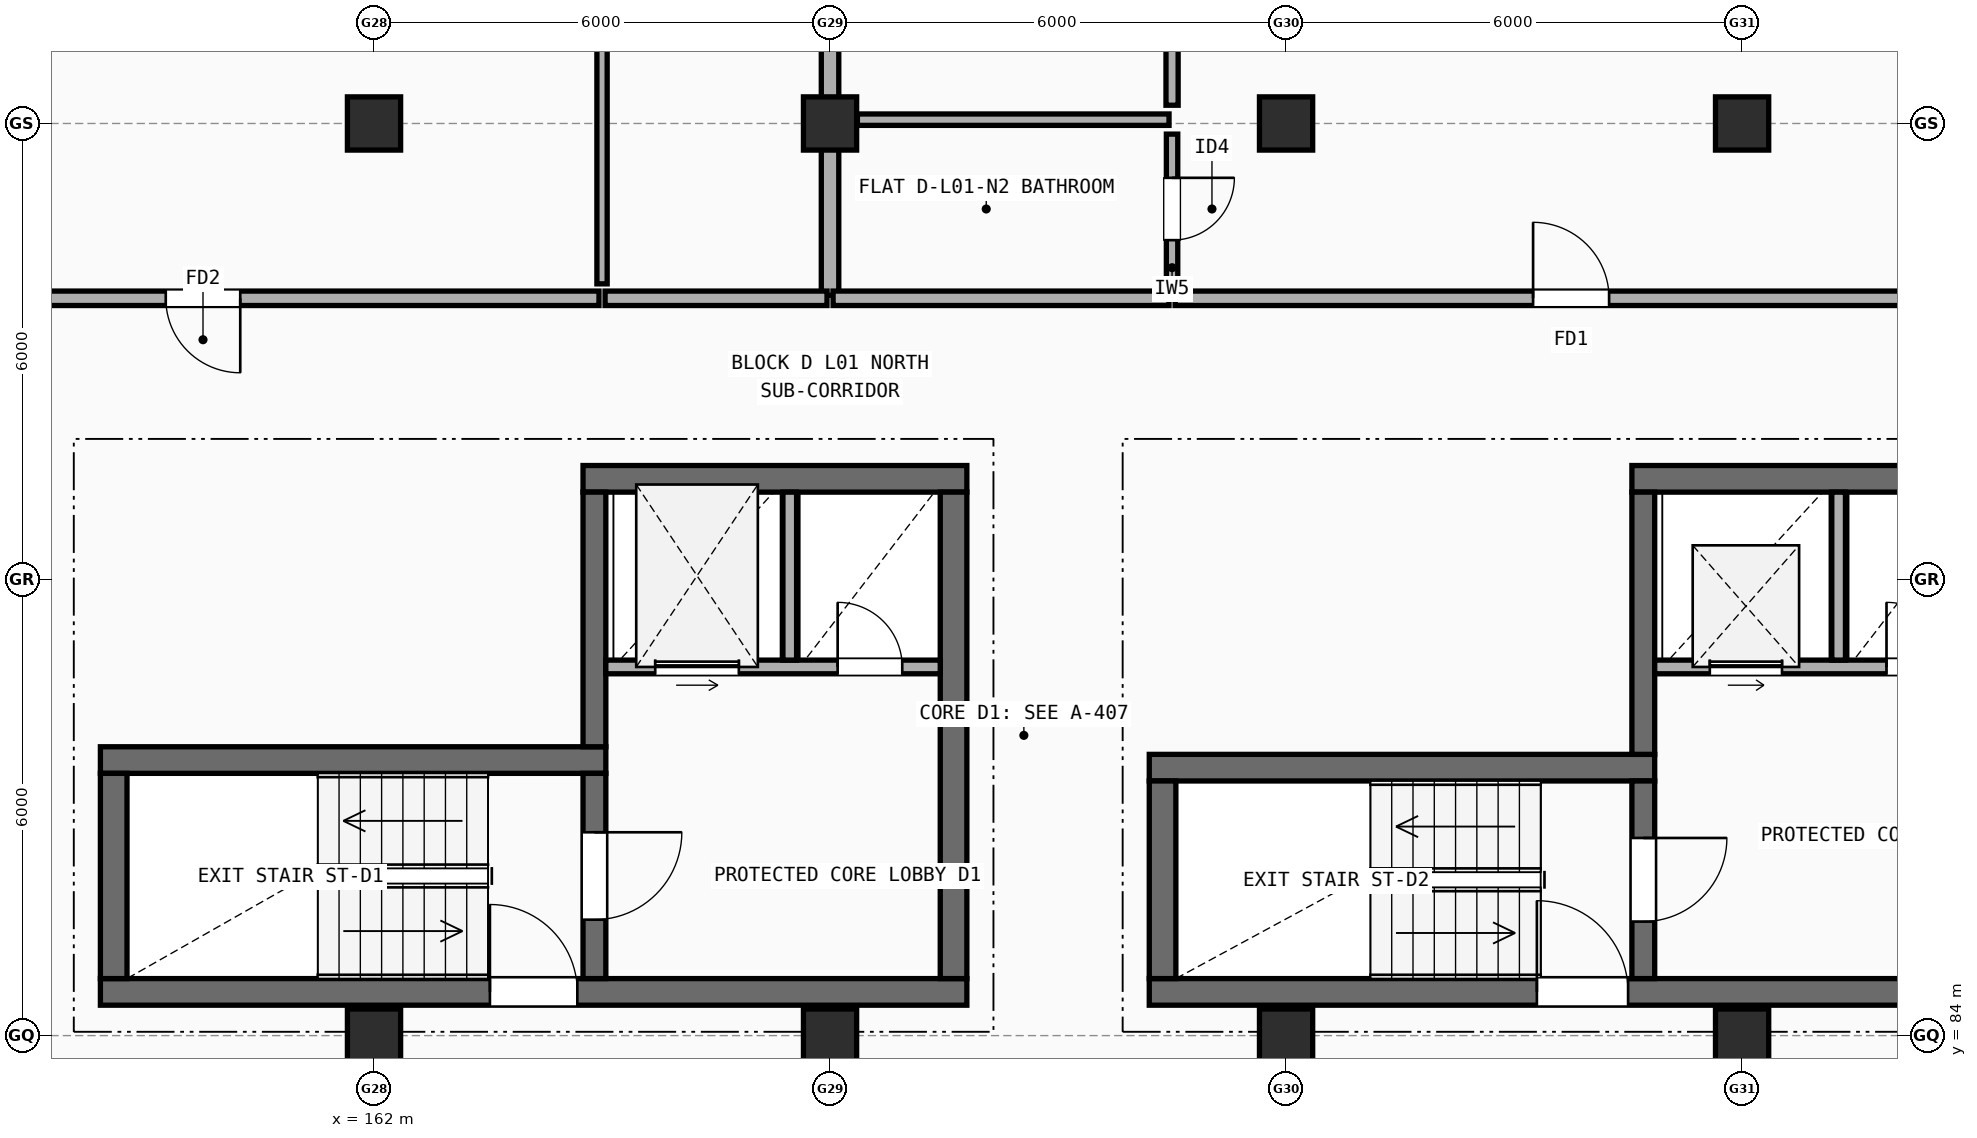
"""IFC4 building model, lengths in metres.
Left out: names, types, materials, properties, quantities, classifications, styles, units other than length and angle.
Written with IfcOpenShell. Run it as: python <this file> out.ifc"""

import sys

from ifc_helpers import new_model, si_unit, direction, frame, frame_2d, origin, origin_2d, place, context, subcontext, project, spatial, rectangle, extrude, element, fill, save


model = new_model("IFC4")
c1 = context("Model", 3, precision=1e-05, world=origin(), true_north=direction((0.0, 1.0)))
c2 = subcontext(c1, "Body", "Model", "MODEL_VIEW")
j1 = project(units=[si_unit("LENGTHUNIT", "METRE"), si_unit("PLANEANGLEUNIT", "RADIAN")], contexts=[c1])
p1 = place(None, origin())
s1 = spatial("IfcSite", under=j1, at=p1, CompositionType="ELEMENT")
p2 = place(p1, origin())
s2 = spatial("IfcBuilding", under=s1, at=p2, CompositionType="ELEMENT")
p3 = place(p2, frame((0.0, 0.0, 4.5)))
s3 = spatial("IfcBuildingStorey", under=s2, at=p3, CompositionType="ELEMENT", Elevation=4.5)
for number, where, z_axis, x_axis in (
    (1, (162.0, 84.0, 0.0), (0.0, 0.0, 1.0), (1.0, 0.0, 0.0)),
    (2, (162.0, 96.0, 0.0), (0.0, 0.0, 1.0), (1.0, 0.0, 0.0)),
    (3, (168.0, 84.0, 0.0), (0.0, 0.0, 1.0), (1.0, 0.0, 0.0)),
    (4, (168.0, 96.0, 0.0), (0.0, 0.0, 1.0), (1.0, 0.0, 0.0)),
    (5, (174.0, 84.0, 0.0), (0.0, 0.0, 1.0), (1.0, 0.0, 0.0)),
    (6, (174.0, 96.0, 0.0), (0.0, 0.0, 1.0), (1.0, 0.0, 0.0)),
    (7, (180.0, 84.0, 0.0), (0.0, 0.0, 1.0), (1.0, 0.0, 0.0)),
    (8, (180.0, 96.0, 0.0), (0.0, 0.0, 1.0), (1.0, 0.0, 0.0)),
):
    element("IfcColumn", number, at=place(p3, frame(where, z_axis=z_axis, x_axis=x_axis)), inside=s3, PredefinedType="COLUMN", context=c2, shape_type="SweptSolid", body=[
        extrude(rectangle(XDim=0.7, YDim=0.7, at=origin_2d()), origin(), (0.0, 0.0, 1.0), 2.945),
    ])
p4 = place(p3, frame((158.4, 84.575, 0.0), z_axis=(0.0, 0.0, 1.0), x_axis=(1.0, 0.0, 0.0)))
e9 = element("IfcWall", 9, at=p4, inside=s3, PredefinedType="SHEAR", context=c2, shape_type="SweptSolid", body=[
    extrude(rectangle(XDim=11.4, YDim=0.35, at=frame_2d((5.7, 0.0))), origin(), (0.0, 0.0, 1.0), 2.945),
])
p5 = place(p4, frame((5.125, 0.0, 0.0)))
e10 = element("IfcOpeningElement", 10, at=p5, cuts=e9, PredefinedType="OPENING", context=c2, shape_type="SweptSolid", body=[
    extrude(rectangle(XDim=1.15, YDim=2.15, at=frame_2d((0.575, 1.075))), frame((0.0, 0.185, 0.0), z_axis=(0.0, -1.0, 0.0), x_axis=(1.0, 0.0, 0.0)), (0.0, 0.0, 1.0), 0.37),
])
p6 = place(p3, frame((165.05, 87.625, 0.0), z_axis=(0.0, 0.0, 1.0), x_axis=(-1.0, 0.0, 0.0)))
e11 = element("IfcWall", 11, at=p6, inside=s3, PredefinedType="SHEAR", context=c2, shape_type="SweptSolid", body=[
    extrude(rectangle(XDim=6.65, YDim=0.35, at=frame_2d((3.325, 0.0))), origin(), (0.0, 0.0, 1.0), 2.945),
])
p7 = place(p3, frame((158.575, 87.45, 0.0), z_axis=(0.0, 0.0, 1.0), x_axis=(0.0, -1.0, 0.0)))
e12 = element("IfcWall", 12, at=p7, inside=s3, PredefinedType="SHEAR", context=c2, shape_type="SweptSolid", body=[
    extrude(rectangle(XDim=2.7, YDim=0.35, at=frame_2d((1.35, 0.0))), origin(), (0.0, 0.0, 1.0), 2.945),
])
p8 = place(p3, frame((164.9, 84.75, 0.0), z_axis=(0.0, 0.0, 1.0), x_axis=(0.0, 1.0, 0.0)))
e13 = element("IfcWall", 13, at=p8, inside=s3, PredefinedType="SHEAR", context=c2, shape_type="SweptSolid", body=[
    extrude(rectangle(XDim=2.7, YDim=0.3, at=frame_2d((1.35, 0.0))), origin(), (0.0, 0.0, 1.0), 2.945),
])
p9 = place(p8, frame((0.775, 0.0, 0.0)))
e14 = element("IfcOpeningElement", 14, at=p9, cuts=e13, PredefinedType="OPENING", context=c2, shape_type="SweptSolid", body=[
    extrude(rectangle(XDim=1.15, YDim=2.15, at=frame_2d((0.575, 1.075))), frame((0.0, 0.16, 0.0), z_axis=(0.0, -1.0, 0.0), x_axis=(1.0, 0.0, 0.0)), (0.0, 0.0, 1.0), 0.32),
])
p10 = place(p3, frame((169.8, 91.325, 0.0), z_axis=(0.0, 0.0, 1.0), x_axis=(-1.0, 0.0, 0.0)))
e15 = element("IfcWall", 15, at=p10, inside=s3, PredefinedType="SHEAR", context=c2, shape_type="SweptSolid", body=[
    extrude(rectangle(XDim=5.05, YDim=0.35, at=frame_2d((2.525, 0.0))), origin(), (0.0, 0.0, 1.0), 2.945),
])
p11 = place(p3, frame((169.625, 84.75, 0.0), z_axis=(0.0, 0.0, 1.0), x_axis=(0.0, 1.0, 0.0)))
e16 = element("IfcWall", 16, at=p11, inside=s3, PredefinedType="SHEAR", context=c2, shape_type="SweptSolid", body=[
    extrude(rectangle(XDim=6.4, YDim=0.35, at=frame_2d((3.2, 0.0))), origin(), (0.0, 0.0, 1.0), 2.945),
])
p12 = place(p3, frame((164.9, 87.8, 0.0), z_axis=(0.0, 0.0, 1.0), x_axis=(0.0, 1.0, 0.0)))
e17 = element("IfcWall", 17, at=p12, inside=s3, PredefinedType="SHEAR", context=c2, shape_type="SweptSolid", body=[
    extrude(rectangle(XDim=3.35, YDim=0.3, at=frame_2d((1.675, 0.0))), origin(), (0.0, 0.0, 1.0), 2.945),
])
p13 = place(p3, frame((165.05, 88.85, 0.0), z_axis=(0.0, 0.0, 1.0), x_axis=(1.0, 0.0, 0.0)))
e18 = element("IfcWall", 18, at=p13, inside=s3, PredefinedType="SOLIDWALL", context=c2, shape_type="SweptSolid", body=[
    extrude(rectangle(XDim=4.4, YDim=0.18, at=frame_2d((2.2, 0.0))), origin(), (0.0, 0.0, 1.0), 2.945),
])
p14 = place(p13, frame((0.65, 0.0, 0.0)))
e19 = element("IfcOpeningElement", 19, at=p14, cuts=e18, PredefinedType="OPENING", context=c2, shape_type="SweptSolid", body=[
    extrude(rectangle(XDim=1.1, YDim=2.15, at=frame_2d((0.55, 1.075))), frame((0.0, 0.1, 0.0), z_axis=(0.0, -1.0, 0.0), x_axis=(1.0, 0.0, 0.0)), (0.0, 0.0, 1.0), 0.2),
])
p15 = place(p13, frame((3.05, 0.0, 0.0)))
e20 = element("IfcOpeningElement", 20, at=p15, cuts=e18, PredefinedType="OPENING", context=c2, shape_type="SweptSolid", body=[
    extrude(rectangle(XDim=0.85, YDim=2.1, at=frame_2d((0.425, 1.05))), frame((0.0, 0.1, 0.0), z_axis=(0.0, -1.0, 0.0), x_axis=(1.0, 0.0, 0.0)), (0.0, 0.0, 1.0), 0.2),
])
p16 = place(p3, frame((167.47, 88.94, 0.0), z_axis=(0.0, 0.0, 1.0), x_axis=(0.0, 1.0, 0.0)))
e21 = element("IfcWall", 21, at=p16, inside=s3, PredefinedType="SOLIDWALL", context=c2, shape_type="SweptSolid", body=[
    extrude(rectangle(XDim=2.21, YDim=0.18, at=frame_2d((1.105, 0.0))), origin(), (0.0, 0.0, 1.0), 2.945),
])
p17 = place(p3, frame((172.2, 84.575, 0.0), z_axis=(0.0, 0.0, 1.0), x_axis=(1.0, 0.0, 0.0)))
e22 = element("IfcWall", 22, at=p17, inside=s3, PredefinedType="SHEAR", context=c2, shape_type="SweptSolid", body=[
    extrude(rectangle(XDim=11.4, YDim=0.35, at=frame_2d((5.7, 0.0))), origin(), (0.0, 0.0, 1.0), 2.945),
])
p18 = place(p17, frame((5.1, 0.0, 0.0)))
e23 = element("IfcOpeningElement", 23, at=p18, cuts=e22, PredefinedType="OPENING", context=c2, shape_type="SweptSolid", body=[
    extrude(rectangle(XDim=1.2, YDim=2.15, at=frame_2d((0.6, 1.075))), frame((0.0, 0.185, 0.0), z_axis=(0.0, -1.0, 0.0), x_axis=(1.0, 0.0, 0.0)), (0.0, 0.0, 1.0), 0.37),
])
p19 = place(p3, frame((178.85, 87.525, 0.0), z_axis=(0.0, 0.0, 1.0), x_axis=(-1.0, 0.0, 0.0)))
e24 = element("IfcWall", 24, at=p19, inside=s3, PredefinedType="SHEAR", context=c2, shape_type="SweptSolid", body=[
    extrude(rectangle(XDim=6.65, YDim=0.35, at=frame_2d((3.325, 0.0))), origin(), (0.0, 0.0, 1.0), 2.945),
])
p20 = place(p3, frame((172.375, 87.35, 0.0), z_axis=(0.0, 0.0, 1.0), x_axis=(0.0, -1.0, 0.0)))
e25 = element("IfcWall", 25, at=p20, inside=s3, PredefinedType="SHEAR", context=c2, shape_type="SweptSolid", body=[
    extrude(rectangle(XDim=2.6, YDim=0.35, at=frame_2d((1.3, 0.0))), origin(), (0.0, 0.0, 1.0), 2.945),
])
p21 = place(p3, frame((178.7, 84.75, 0.0), z_axis=(0.0, 0.0, 1.0), x_axis=(0.0, 1.0, 0.0)))
e26 = element("IfcWall", 26, at=p21, inside=s3, PredefinedType="SHEAR", context=c2, shape_type="SweptSolid", body=[
    extrude(rectangle(XDim=2.6, YDim=0.3, at=frame_2d((1.3, 0.0))), origin(), (0.0, 0.0, 1.0), 2.945),
])
p22 = place(p21, frame((0.75, 0.0, 0.0)))
e27 = element("IfcOpeningElement", 27, at=p22, cuts=e26, PredefinedType="OPENING", context=c2, shape_type="SweptSolid", body=[
    extrude(rectangle(XDim=1.1, YDim=2.15, at=frame_2d((0.55, 1.075))), frame((0.0, 0.16, 0.0), z_axis=(0.0, -1.0, 0.0), x_axis=(1.0, 0.0, 0.0)), (0.0, 0.0, 1.0), 0.32),
])
p23 = place(p3, frame((183.6, 91.325, 0.0), z_axis=(0.0, 0.0, 1.0), x_axis=(-1.0, 0.0, 0.0)))
e28 = element("IfcWall", 28, at=p23, inside=s3, PredefinedType="SHEAR", context=c2, shape_type="SweptSolid", body=[
    extrude(rectangle(XDim=5.05, YDim=0.35, at=frame_2d((2.525, 0.0))), origin(), (0.0, 0.0, 1.0), 2.945),
])
p24 = place(p3, frame((178.7, 87.7, 0.0), z_axis=(0.0, 0.0, 1.0), x_axis=(0.0, 1.0, 0.0)))
e29 = element("IfcWall", 29, at=p24, inside=s3, PredefinedType="SHEAR", context=c2, shape_type="SweptSolid", body=[
    extrude(rectangle(XDim=3.45, YDim=0.3, at=frame_2d((1.725, 0.0))), origin(), (0.0, 0.0, 1.0), 2.945),
])
p25 = place(p3, frame((178.85, 88.85, 0.0), z_axis=(0.0, 0.0, 1.0), x_axis=(1.0, 0.0, 0.0)))
e30 = element("IfcWall", 30, at=p25, inside=s3, PredefinedType="SOLIDWALL", context=c2, shape_type="SweptSolid", body=[
    extrude(rectangle(XDim=4.4, YDim=0.18, at=frame_2d((2.2, 0.0))), origin(), (0.0, 0.0, 1.0), 2.945),
])
p26 = place(p25, frame((0.725, 0.0, 0.0)))
e31 = element("IfcOpeningElement", 31, at=p26, cuts=e30, PredefinedType="OPENING", context=c2, shape_type="SweptSolid", body=[
    extrude(rectangle(XDim=0.95, YDim=2.15, at=frame_2d((0.475, 1.075))), frame((0.0, 0.1, 0.0), z_axis=(0.0, -1.0, 0.0), x_axis=(1.0, 0.0, 0.0)), (0.0, 0.0, 1.0), 0.2),
])
p27 = place(p25, frame((3.05, 0.0, 0.0)))
e32 = element("IfcOpeningElement", 32, at=p27, cuts=e30, PredefinedType="OPENING", context=c2, shape_type="SweptSolid", body=[
    extrude(rectangle(XDim=0.85, YDim=2.1, at=frame_2d((0.425, 1.05))), frame((0.0, 0.1, 0.0), z_axis=(0.0, -1.0, 0.0), x_axis=(1.0, 0.0, 0.0)), (0.0, 0.0, 1.0), 0.2),
])
p28 = place(p3, frame((181.27, 88.94, 0.0), z_axis=(0.0, 0.0, 1.0), x_axis=(0.0, 1.0, 0.0)))
e33 = element("IfcWall", 33, at=p28, inside=s3, PredefinedType="SOLIDWALL", context=c2, shape_type="SweptSolid", body=[
    extrude(rectangle(XDim=2.21, YDim=0.18, at=frame_2d((1.105, 0.0))), origin(), (0.0, 0.0, 1.0), 2.945),
])
p29 = place(p3, frame((168.0, 93.74, 0.0), z_axis=(0.0, 0.0, 1.0), x_axis=(0.0, 1.0, 0.0)))
e34 = element("IfcWall", 34, at=p29, inside=s3, PredefinedType="SOLIDWALL", context=c2, shape_type="SweptSolid", body=[
    extrude(rectangle(XDim=13.87, YDim=0.23, at=frame_2d((6.935, 0.0))), origin(), (0.0, 0.0, 1.0), 2.945),
])
p30 = place(p3, frame((154.54, 93.7, 0.0), z_axis=(0.0, 0.0, 1.0), x_axis=(1.0, 0.0, 0.0)))
e35 = element("IfcWall", 35, at=p30, inside=s3, PredefinedType="SOLIDWALL", context=c2, shape_type="SweptSolid", body=[
    extrude(rectangle(XDim=10.42, YDim=0.19, at=frame_2d((5.21, 0.0))), origin(), (0.0, 0.0, 1.0), 2.945),
])
p31 = place(p30, frame((4.72, 0.0, 0.0)))
e36 = element("IfcOpeningElement", 36, at=p31, cuts=e35, PredefinedType="OPENING", context=c2, shape_type="SweptSolid", body=[
    extrude(rectangle(XDim=0.98, YDim=2.15, at=frame_2d((0.49, 1.075))), frame((0.0, 0.105, 0.0), z_axis=(0.0, -1.0, 0.0), x_axis=(1.0, 0.0, 0.0)), (0.0, 0.0, 1.0), 0.21),
])
p32 = place(p3, frame((165.04, 93.7, 0.0), z_axis=(0.0, 0.0, 1.0), x_axis=(1.0, 0.0, 0.0)))
e37 = element("IfcWall", 37, at=p32, inside=s3, PredefinedType="SOLIDWALL", context=c2, shape_type="SweptSolid", body=[
    extrude(rectangle(XDim=2.92, YDim=0.19, at=frame_2d((1.46, 0.0))), origin(), (0.0, 0.0, 1.0), 2.945),
])
p33 = place(p3, frame((165.0, 93.89, 0.0), z_axis=(0.0, 0.0, 1.0), x_axis=(0.0, 1.0, 0.0)))
e38 = element("IfcWall", 38, at=p33, inside=s3, PredefinedType="PARTITIONING", context=c2, shape_type="SweptSolid", body=[
    extrude(rectangle(XDim=13.92, YDim=0.135, at=frame_2d((6.96, 0.0))), origin(), (0.0, 0.0, 1.0), 2.458),
])
p34 = place(p33, frame((6.65, 0.0, 0.0)))
e39 = element("IfcOpeningElement", 39, at=p34, cuts=e38, PredefinedType="OPENING", context=c2, shape_type="SweptSolid", body=[
    extrude(rectangle(XDim=0.9, YDim=2.1, at=frame_2d((0.45, 1.05))), frame((0.0, 0.077, 0.0), z_axis=(0.0, -1.0, 0.0), x_axis=(1.0, 0.0, 0.0)), (0.0, 0.0, 1.0), 0.155),
])
p35 = place(p3, frame((168.04, 93.7, 0.0), z_axis=(0.0, 0.0, 1.0), x_axis=(1.0, 0.0, 0.0)))
e40 = element("IfcWall", 40, at=p35, inside=s3, PredefinedType="SOLIDWALL", context=c2, shape_type="SweptSolid", body=[
    extrude(rectangle(XDim=4.42, YDim=0.19, at=frame_2d((2.21, 0.0))), origin(), (0.0, 0.0, 1.0), 2.945),
])
p36 = place(p3, frame((172.54, 93.7, 0.0), z_axis=(0.0, 0.0, 1.0), x_axis=(1.0, 0.0, 0.0)))
e41 = element("IfcWall", 41, at=p36, inside=s3, PredefinedType="SOLIDWALL", context=c2, shape_type="SweptSolid", body=[
    extrude(rectangle(XDim=10.42, YDim=0.19, at=frame_2d((5.21, 0.0))), origin(), (0.0, 0.0, 1.0), 2.945),
])
p37 = place(p36, frame((4.71, 0.0, 0.0)))
e42 = element("IfcOpeningElement", 42, at=p37, cuts=e41, PredefinedType="OPENING", context=c2, shape_type="SweptSolid", body=[
    extrude(rectangle(XDim=1.0, YDim=2.15, at=frame_2d((0.5, 1.075))), frame((0.0, 0.105, 0.0), z_axis=(0.0, -1.0, 0.0), x_axis=(1.0, 0.0, 0.0)), (0.0, 0.0, 1.0), 0.21),
])
p38 = place(p3, frame((172.5, 96.24, 0.0), z_axis=(0.0, 0.0, 1.0), x_axis=(0.0, 1.0, 0.0)))
e43 = element("IfcWall", 43, at=p38, inside=s3, PredefinedType="PLUMBINGWALL", context=c2, shape_type="SweptSolid", body=[
    extrude(rectangle(XDim=7.37, YDim=0.16, at=frame_2d((3.685, 0.0))), origin(), (0.0, 0.0, 1.0), 2.638),
])
p39 = place(p38, frame((3.245, 0.0, 0.0)))
e44 = element("IfcOpeningElement", 44, at=p39, cuts=e43, PredefinedType="OPENING", context=c2, shape_type="SweptSolid", body=[
    extrude(rectangle(XDim=0.88, YDim=2.1, at=frame_2d((0.44, 1.05))), frame((0.0, 0.09, 0.0), z_axis=(0.0, -1.0, 0.0), x_axis=(1.0, 0.0, 0.0)), (0.0, 0.0, 1.0), 0.18),
])
p40 = place(p3, frame((172.5, 93.89, 0.0), z_axis=(0.0, 0.0, 1.0), x_axis=(0.0, 1.0, 0.0)))
e45 = element("IfcWall", 45, at=p40, inside=s3, PredefinedType="PARTITIONING", context=c2, shape_type="SweptSolid", body=[
    extrude(rectangle(XDim=1.97, YDim=0.15, at=frame_2d((0.985, 0.0))), origin(), (0.0, 0.0, 1.0), 2.945),
])
p41 = place(p40, frame((0.575, 0.0, 0.0)))
e46 = element("IfcOpeningElement", 46, at=p41, cuts=e45, PredefinedType="OPENING", context=c2, shape_type="SweptSolid", body=[
    extrude(rectangle(XDim=0.82, YDim=2.08, at=frame_2d((0.41, 1.04))), frame((0.0, 0.085, 0.0), z_axis=(0.0, -1.0, 0.0), x_axis=(1.0, 0.0, 0.0)), (0.0, 0.0, 1.0), 0.17),
])
p42 = place(p3, frame((168.36, 96.05, 0.0), z_axis=(0.0, 0.0, 1.0), x_axis=(1.0, 0.0, 0.0)))
e47 = element("IfcWall", 47, at=p42, inside=s3, PredefinedType="PARTITIONING", context=c2, shape_type="SweptSolid", body=[
    extrude(rectangle(XDim=4.1, YDim=0.15, at=frame_2d((2.05, 0.0))), origin(), (0.0, 0.0, 1.0), 2.608),
])
p43 = place(p5, origin())
e48 = element("IfcDoor", 48, at=p43, inside=s3, OperationType="SINGLE_SWING_LEFT", PredefinedType="DOOR", context=c2, shape_type="SweptSolid", body=[
    extrude(rectangle(XDim=1.15, YDim=2.15, at=frame_2d((0.575, 1.075))), frame((0.0, 0.025, 0.0), z_axis=(0.0, -1.0, 0.0), x_axis=(1.0, 0.0, 0.0)), (0.0, 0.0, 1.0), 0.05),
])
fill(e10, e48)
p44 = place(p9, origin())
e49 = element("IfcDoor", 49, at=p44, inside=s3, OperationType="SINGLE_SWING_RIGHT", PredefinedType="DOOR", context=c2, shape_type="SweptSolid", body=[
    extrude(rectangle(XDim=1.15, YDim=2.15, at=frame_2d((0.575, 1.075))), frame((0.0, 0.025, 0.0), z_axis=(0.0, -1.0, 0.0), x_axis=(1.0, 0.0, 0.0)), (0.0, 0.0, 1.0), 0.05),
])
fill(e14, e49)
p45 = place(p14, origin())
e50 = element("IfcDoor", 50, at=p45, inside=s3, OperationType="SLIDING_TO_LEFT", PredefinedType="DOOR", context=c2, shape_type="SweptSolid", body=[
    extrude(rectangle(XDim=1.1, YDim=2.15, at=frame_2d((0.55, 1.075))), frame((0.0, 0.025, 0.0), z_axis=(0.0, -1.0, 0.0), x_axis=(1.0, 0.0, 0.0)), (0.0, 0.0, 1.0), 0.05),
])
fill(e19, e50)
p46 = place(p15, frame((0.85, 0.0, 0.0), z_axis=(0.0, 0.0, 1.0), x_axis=(-1.0, 0.0, 0.0)))
e51 = element("IfcDoor", 51, at=p46, inside=s3, OperationType="SINGLE_SWING_LEFT", PredefinedType="DOOR", context=c2, shape_type="SweptSolid", body=[
    extrude(rectangle(XDim=0.85, YDim=2.1, at=frame_2d((0.425, 1.05))), frame((0.0, 0.025, 0.0), z_axis=(0.0, -1.0, 0.0), x_axis=(1.0, 0.0, 0.0)), (0.0, 0.0, 1.0), 0.05),
])
fill(e20, e51)
p47 = place(p18, origin())
e52 = element("IfcDoor", 52, at=p47, inside=s3, OperationType="SINGLE_SWING_LEFT", PredefinedType="DOOR", context=c2, shape_type="SweptSolid", body=[
    extrude(rectangle(XDim=1.2, YDim=2.15, at=frame_2d((0.6, 1.075))), frame((0.0, 0.025, 0.0), z_axis=(0.0, -1.0, 0.0), x_axis=(1.0, 0.0, 0.0)), (0.0, 0.0, 1.0), 0.05),
])
fill(e23, e52)
p48 = place(p22, origin())
e53 = element("IfcDoor", 53, at=p48, inside=s3, OperationType="SINGLE_SWING_RIGHT", PredefinedType="DOOR", context=c2, shape_type="SweptSolid", body=[
    extrude(rectangle(XDim=1.1, YDim=2.15, at=frame_2d((0.55, 1.075))), frame((0.0, 0.025, 0.0), z_axis=(0.0, -1.0, 0.0), x_axis=(1.0, 0.0, 0.0)), (0.0, 0.0, 1.0), 0.05),
])
fill(e27, e53)
p49 = place(p26, origin())
e54 = element("IfcDoor", 54, at=p49, inside=s3, OperationType="SLIDING_TO_LEFT", PredefinedType="DOOR", context=c2, shape_type="SweptSolid", body=[
    extrude(rectangle(XDim=0.95, YDim=2.15, at=frame_2d((0.475, 1.075))), frame((0.0, 0.025, 0.0), z_axis=(0.0, -1.0, 0.0), x_axis=(1.0, 0.0, 0.0)), (0.0, 0.0, 1.0), 0.05),
])
fill(e31, e54)
p50 = place(p27, frame((0.85, 0.0, 0.0), z_axis=(0.0, 0.0, 1.0), x_axis=(-1.0, 0.0, 0.0)))
e55 = element("IfcDoor", 55, at=p50, inside=s3, OperationType="SINGLE_SWING_LEFT", PredefinedType="DOOR", context=c2, shape_type="SweptSolid", body=[
    extrude(rectangle(XDim=0.85, YDim=2.1, at=frame_2d((0.425, 1.05))), frame((0.0, 0.025, 0.0), z_axis=(0.0, -1.0, 0.0), x_axis=(1.0, 0.0, 0.0)), (0.0, 0.0, 1.0), 0.05),
])
fill(e32, e55)
p51 = place(p31, origin())
e56 = element("IfcDoor", 56, at=p51, inside=s3, OperationType="SINGLE_SWING_RIGHT", PredefinedType="DOOR", context=c2, shape_type="SweptSolid", body=[
    extrude(rectangle(XDim=0.98, YDim=2.15, at=frame_2d((0.49, 1.075))), frame((0.0, 0.025, 0.0), z_axis=(0.0, -1.0, 0.0), x_axis=(1.0, 0.0, 0.0)), (0.0, 0.0, 1.0), 0.05),
])
fill(e36, e56)
p52 = place(p37, origin())
e57 = element("IfcDoor", 57, at=p52, inside=s3, OperationType="SINGLE_SWING_LEFT", PredefinedType="DOOR", context=c2, shape_type="SweptSolid", body=[
    extrude(rectangle(XDim=1.0, YDim=2.15, at=frame_2d((0.5, 1.075))), frame((0.0, 0.025, 0.0), z_axis=(0.0, -1.0, 0.0), x_axis=(1.0, 0.0, 0.0)), (0.0, 0.0, 1.0), 0.05),
])
fill(e42, e57)
p53 = place(p41, origin())
e58 = element("IfcDoor", 58, at=p53, inside=s3, OperationType="SINGLE_SWING_RIGHT", PredefinedType="DOOR", context=c2, shape_type="SweptSolid", body=[
    extrude(rectangle(XDim=0.82, YDim=2.08, at=frame_2d((0.41, 1.04))), frame((0.0, 0.025, 0.0), z_axis=(0.0, -1.0, 0.0), x_axis=(1.0, 0.0, 0.0)), (0.0, 0.0, 1.0), 0.05),
])
fill(e46, e58)
save(model, sys.argv[1])
